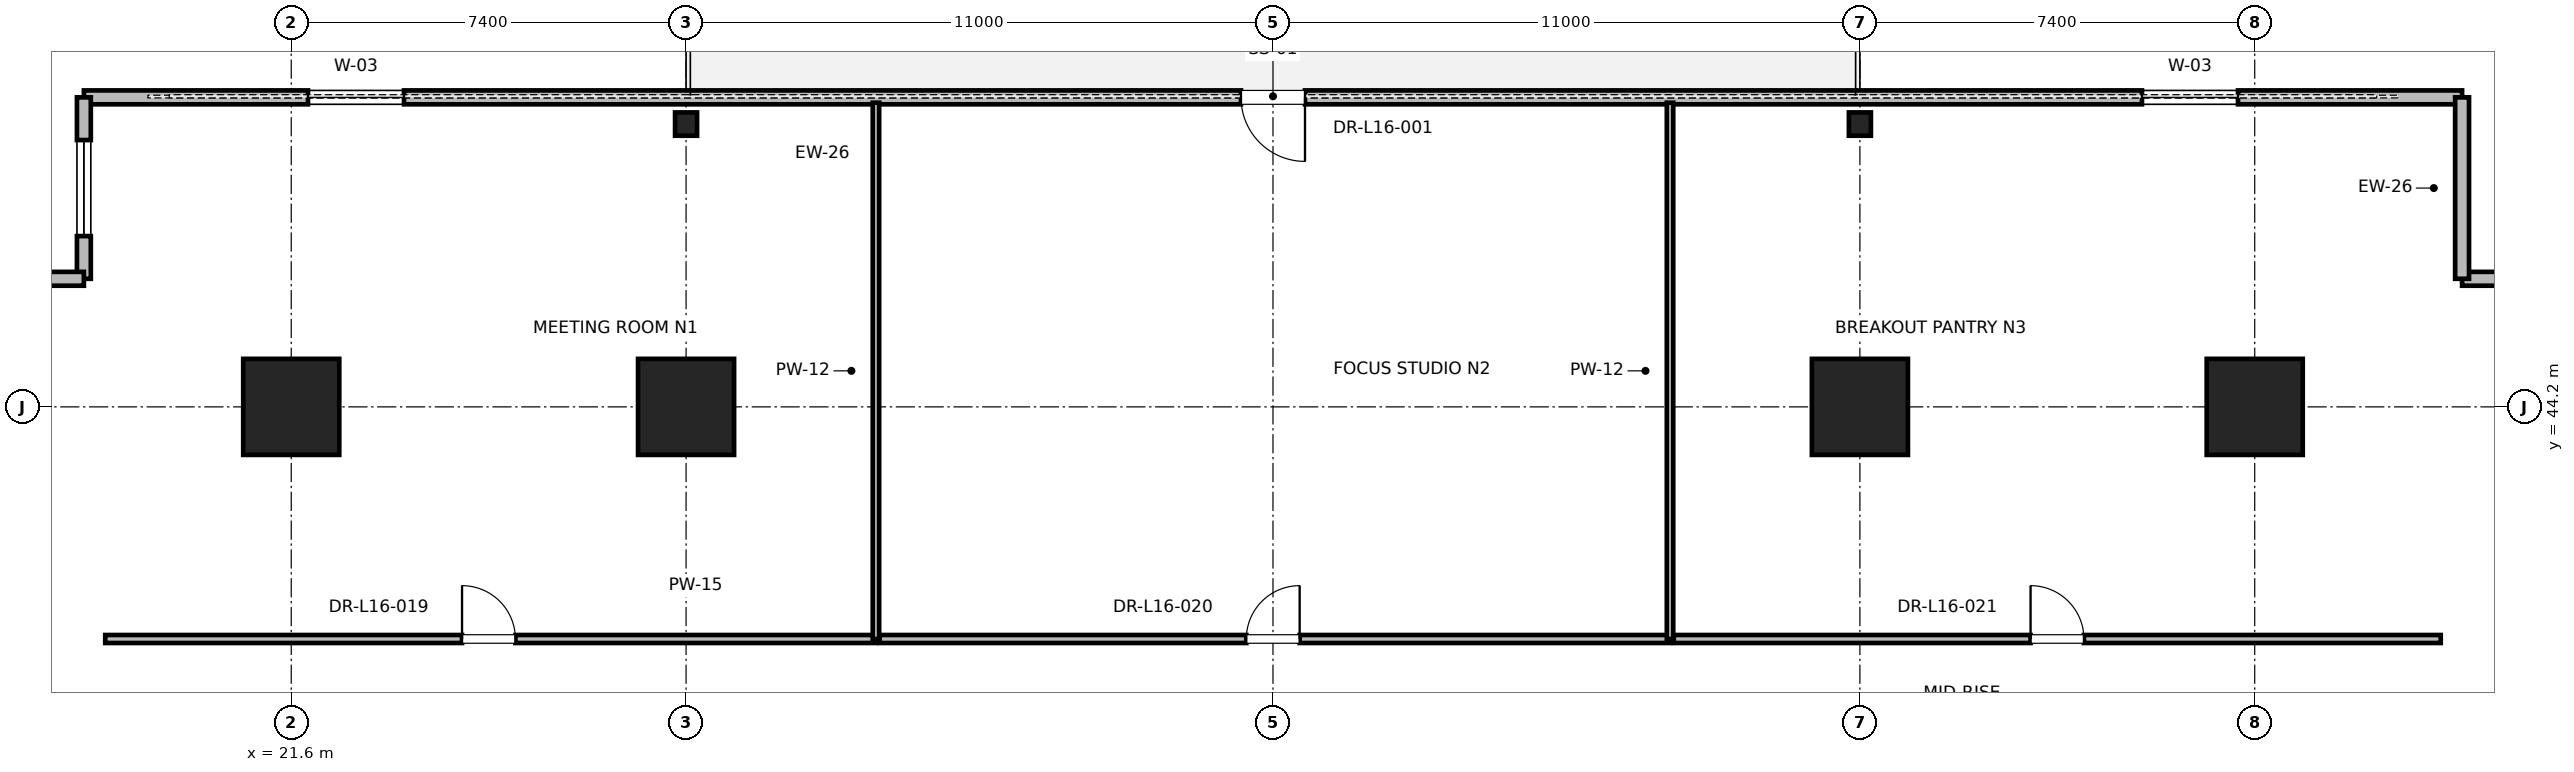
"""IFC4 building model, lengths in metres.
Left out: names, types, materials, properties, quantities, classifications, styles, units other than length and angle.
Written with IfcOpenShell. Run it as: python <this file> out.ifc"""

import sys

from ifc_helpers import new_model, si_unit, direction, frame, frame_2d, origin, origin_2d, place, context, subcontext, project, spatial, rectangle, i_section, extrude, element, fill, save


model = new_model("IFC4")
c1 = context("Model", 3, precision=1e-05, world=origin(), true_north=direction((0.0, 1.0)))
c2 = subcontext(c1, "Body", "Model", "MODEL_VIEW")
j1 = project(units=[si_unit("LENGTHUNIT", "METRE"), si_unit("PLANEANGLEUNIT", "RADIAN")], contexts=[c1])
p1 = place(None, origin())
s1 = spatial("IfcSite", under=j1, at=p1, CompositionType="ELEMENT")
p2 = place(p1, origin())
s2 = spatial("IfcBuilding", under=s1, at=p2, CompositionType="ELEMENT")
p3 = place(p2, frame((0.0, 0.0, 71.6)))
s3 = spatial("IfcBuildingStorey", under=s2, at=p3, CompositionType="ELEMENT", Elevation=71.6)
for number, where, z_axis, x_axis in (
    (1, (29.0, 44.2, 0.0), (0.0, 0.0, 1.0), (1.0, 0.0, 0.0)),
    (2, (51.0, 44.2, 0.0), (0.0, 0.0, 1.0), (1.0, 0.0, 0.0)),
    (3, (21.6, 44.2, 0.0), (0.0, 0.0, 1.0), (1.0, 0.0, 0.0)),
    (4, (58.4, 44.2, 0.0), (0.0, 0.0, 1.0), (1.0, 0.0, 0.0)),
):
    element("IfcColumn", number, at=place(p3, frame(where, z_axis=z_axis, x_axis=x_axis)), inside=s3, PredefinedType="COLUMN", context=c2, shape_type="SweptSolid", body=[
        extrude(rectangle(XDim=1.8, YDim=1.8, at=origin_2d()), origin(), (0.0, 0.0, 1.0), 4.0),
    ])
for number, where, z_axis, x_axis in (
    (5, (29.0, 49.5, 0.0), (0.0, 0.0, 1.0), (1.0, 0.0, 0.0)),
    (6, (51.0, 49.5, 0.0), (0.0, 0.0, 1.0), (1.0, 0.0, 0.0)),
):
    element("IfcColumn", number, at=place(p3, frame(where, z_axis=z_axis, x_axis=x_axis)), inside=s3, PredefinedType="COLUMN", context=c2, shape_type="SweptSolid", body=[
        extrude(i_section(OverallWidth=0.412, OverallDepth=0.437, WebThickness=0.036, FlangeThickness=0.058, FilletRadius=0.015, at=origin_2d()), origin(), (0.0, 0.0, 1.0), 4.0),
    ])
p4 = place(p3, frame((62.286, 50.0, 0.0), z_axis=(0.0, 0.0, 1.0), x_axis=(-1.0, 0.0, 0.0)))
e7 = element("IfcWall", 7, at=p4, inside=s3, PredefinedType="PARAPET", context=c2, shape_type="SweptSolid", body=[
    extrude(rectangle(XDim=44.573, YDim=0.26, at=frame_2d((22.286, 0.0))), origin(), (0.0, 0.0, 1.0), 2.889),
])
p5 = place(p4, frame((4.2, 0.0, 0.85)))
e8 = element("IfcOpeningElement", 8, at=p5, cuts=e7, PredefinedType="OPENING", context=c2, shape_type="SweptSolid", body=[
    extrude(rectangle(XDim=1.8, YDim=2.2, at=frame_2d((0.9, 1.1))), frame((0.0, 0.13, 0.0), z_axis=(0.0, -1.0, 0.0), x_axis=(1.0, 0.0, 0.0)), (0.0, 0.0, 1.0), 0.26),
])
p6 = place(p4, frame((21.686, 0.0, 0.0)))
e9 = element("IfcOpeningElement", 9, at=p6, cuts=e7, PredefinedType="OPENING", context=c2, shape_type="SweptSolid", body=[
    extrude(rectangle(XDim=1.2, YDim=2.2, at=frame_2d((0.6, 1.1))), frame((0.0, 0.13, 0.0), z_axis=(0.0, -1.0, 0.0), x_axis=(1.0, 0.0, 0.0)), (0.0, 0.0, 1.0), 0.26),
])
p7 = place(p4, frame((38.573, 0.0, 0.85)))
e10 = element("IfcOpeningElement", 10, at=p7, cuts=e7, PredefinedType="OPENING", context=c2, shape_type="SweptSolid", body=[
    extrude(rectangle(XDim=1.8, YDim=2.2, at=frame_2d((0.9, 1.1))), frame((0.0, 0.13, 0.0), z_axis=(0.0, -1.0, 0.0), x_axis=(1.0, 0.0, 0.0)), (0.0, 0.0, 1.0), 0.26),
])
p8 = place(p3, frame((66.086, 46.601, 0.0), z_axis=(0.0, 0.0, 1.0), x_axis=(-1.0, 0.0, 0.0)))
e11 = element("IfcWall", 11, at=p8, inside=s3, PredefinedType="PARAPET", context=c2, shape_type="SweptSolid", body=[
    extrude(rectangle(XDim=3.8, YDim=0.26, at=frame_2d((1.9, 0.0))), origin(), (0.0, 0.0, 1.0), 3.76),
])
p9 = place(p8, frame((1.0, 0.0, 0.85)))
e12 = element("IfcOpeningElement", 12, at=p9, cuts=e11, PredefinedType="OPENING", context=c2, shape_type="SweptSolid", body=[
    extrude(rectangle(XDim=1.8, YDim=2.2, at=frame_2d((0.9, 1.1))), frame((0.0, 0.13, 0.0), z_axis=(0.0, -1.0, 0.0), x_axis=(1.0, 0.0, 0.0)), (0.0, 0.0, 1.0), 0.26),
])
p10 = place(p3, frame((62.286, 46.601, 0.0), z_axis=(0.0, 0.0, 1.0), x_axis=(0.0, 1.0, 0.0)))
e13 = element("IfcWall", 13, at=p10, inside=s3, PredefinedType="PARAPET", context=c2, shape_type="SweptSolid", body=[
    extrude(rectangle(XDim=3.4, YDim=0.26, at=frame_2d((1.7, 0.0))), origin(), (0.0, 0.0, 1.0), 3.76),
])
p11 = place(p3, frame((17.714, 50.0, 0.0), z_axis=(0.0, 0.0, 1.0), x_axis=(0.0, -1.0, 0.0)))
e14 = element("IfcWall", 14, at=p11, inside=s3, PredefinedType="PARAPET", context=c2, shape_type="SweptSolid", body=[
    extrude(rectangle(XDim=3.4, YDim=0.26, at=frame_2d((1.7, 0.0))), origin(), (0.0, 0.0, 1.0), 3.76),
])
p12 = place(p11, frame((0.8, 0.0, 0.85)))
e15 = element("IfcOpeningElement", 15, at=p12, cuts=e14, PredefinedType="OPENING", context=c2, shape_type="SweptSolid", body=[
    extrude(rectangle(XDim=1.8, YDim=2.2, at=frame_2d((0.9, 1.1))), frame((0.0, 0.13, 0.0), z_axis=(0.0, -1.0, 0.0), x_axis=(1.0, 0.0, 0.0)), (0.0, 0.0, 1.0), 0.26),
])
p13 = place(p3, frame((17.714, 46.601, 0.0), z_axis=(0.0, 0.0, 1.0), x_axis=(-1.0, 0.0, 0.0)))
e16 = element("IfcWall", 16, at=p13, inside=s3, PredefinedType="PARAPET", context=c2, shape_type="SweptSolid", body=[
    extrude(rectangle(XDim=3.8, YDim=0.26, at=frame_2d((1.9, 0.0))), origin(), (0.0, 0.0, 1.0), 3.76),
])
p14 = place(p3, frame((18.114, 39.85, 0.0), z_axis=(0.0, 0.0, 1.0), x_axis=(1.0, 0.0, 0.0)))
e17 = element("IfcWall", 17, at=p14, inside=s3, PredefinedType="PARTITIONING", context=c2, shape_type="SweptSolid", body=[
    extrude(rectangle(XDim=14.445, YDim=0.15, at=frame_2d((7.223, 0.0))), origin(), (0.0, 0.0, 1.0), 2.85),
])
p15 = place(p14, frame((6.688, 0.0, 0.0)))
e18 = element("IfcOpeningElement", 18, at=p15, cuts=e17, PredefinedType="OPENING", context=c2, shape_type="SweptSolid", body=[
    extrude(rectangle(XDim=1.0, YDim=2.15, at=frame_2d((0.5, 1.075))), frame((0.0, 0.075, 0.0), z_axis=(0.0, -1.0, 0.0), x_axis=(1.0, 0.0, 0.0)), (0.0, 0.0, 1.0), 0.15),
])
p16 = place(p3, frame((32.559, 39.85, 0.0), z_axis=(0.0, 0.0, 1.0), x_axis=(0.0, 1.0, 0.0)))
e19 = element("IfcWall", 19, at=p16, inside=s3, PredefinedType="PARTITIONING", context=c2, shape_type="SweptSolid", body=[
    extrude(rectangle(XDim=10.05, YDim=0.12, at=frame_2d((5.025, 0.0))), origin(), (0.0, 0.0, 1.0), 2.39),
])
p17 = place(p3, frame((32.629, 39.85, 0.0), z_axis=(0.0, 0.0, 1.0), x_axis=(1.0, 0.0, 0.0)))
e20 = element("IfcWall", 20, at=p17, inside=s3, PredefinedType="PARTITIONING", context=c2, shape_type="SweptSolid", body=[
    extrude(rectangle(XDim=14.813, YDim=0.15, at=frame_2d((7.406, 0.0))), origin(), (0.0, 0.0, 1.0), 2.85),
])
p18 = place(p17, frame((6.871, 0.0, 0.0)))
e21 = element("IfcOpeningElement", 21, at=p18, cuts=e20, PredefinedType="OPENING", context=c2, shape_type="SweptSolid", body=[
    extrude(rectangle(XDim=1.0, YDim=2.15, at=frame_2d((0.5, 1.075))), frame((0.0, 0.075, 0.0), z_axis=(0.0, -1.0, 0.0), x_axis=(1.0, 0.0, 0.0)), (0.0, 0.0, 1.0), 0.15),
])
p19 = place(p3, frame((47.441, 39.85, 0.0), z_axis=(0.0, 0.0, 1.0), x_axis=(0.0, 1.0, 0.0)))
e22 = element("IfcWall", 22, at=p19, inside=s3, PredefinedType="PARTITIONING", context=c2, shape_type="SweptSolid", body=[
    extrude(rectangle(XDim=10.05, YDim=0.12, at=frame_2d((5.025, 0.0))), origin(), (0.0, 0.0, 1.0), 2.39),
])
p20 = place(p3, frame((47.511, 39.85, 0.0), z_axis=(0.0, 0.0, 1.0), x_axis=(1.0, 0.0, 0.0)))
e23 = element("IfcWall", 23, at=p20, inside=s3, PredefinedType="PARTITIONING", context=c2, shape_type="SweptSolid", body=[
    extrude(rectangle(XDim=14.375, YDim=0.15, at=frame_2d((7.188, 0.0))), origin(), (0.0, 0.0, 1.0), 2.85),
])
p21 = place(p20, frame((6.688, 0.0, 0.0)))
e24 = element("IfcOpeningElement", 24, at=p21, cuts=e23, PredefinedType="OPENING", context=c2, shape_type="SweptSolid", body=[
    extrude(rectangle(XDim=1.0, YDim=2.15, at=frame_2d((0.5, 1.075))), frame((0.0, 0.075, 0.0), z_axis=(0.0, -1.0, 0.0), x_axis=(1.0, 0.0, 0.0)), (0.0, 0.0, 1.0), 0.15),
])
p22 = place(p5, origin())
e25 = element("IfcWindow", 25, at=p22, inside=s3, PartitioningType="SINGLE_PANEL", PredefinedType="WINDOW", context=c2, shape_type="SweptSolid", body=[
    extrude(rectangle(XDim=1.8, YDim=2.2, at=frame_2d((0.9, 1.1))), frame((0.0, 0.03, 0.0), z_axis=(0.0, -1.0, 0.0), x_axis=(1.0, 0.0, 0.0)), (0.0, 0.0, 1.0), 0.06),
])
fill(e8, e25)
p23 = place(p6, origin())
e26 = element("IfcDoor", 26, at=p23, inside=s3, OperationType="SINGLE_SWING_LEFT", PredefinedType="DOOR", context=c2, shape_type="SweptSolid", body=[
    extrude(rectangle(XDim=1.2, YDim=2.2, at=frame_2d((0.6, 1.1))), frame((0.0, 0.025, 0.0), z_axis=(0.0, -1.0, 0.0), x_axis=(1.0, 0.0, 0.0)), (0.0, 0.0, 1.0), 0.05),
])
fill(e9, e26)
p24 = place(p7, origin())
e27 = element("IfcWindow", 27, at=p24, inside=s3, PartitioningType="SINGLE_PANEL", PredefinedType="WINDOW", context=c2, shape_type="SweptSolid", body=[
    extrude(rectangle(XDim=1.8, YDim=2.2, at=frame_2d((0.9, 1.1))), frame((0.0, 0.03, 0.0), z_axis=(0.0, -1.0, 0.0), x_axis=(1.0, 0.0, 0.0)), (0.0, 0.0, 1.0), 0.06),
])
fill(e10, e27)
p25 = place(p12, origin())
e28 = element("IfcWindow", 28, at=p25, inside=s3, PartitioningType="SINGLE_PANEL", PredefinedType="WINDOW", context=c2, shape_type="SweptSolid", body=[
    extrude(rectangle(XDim=1.8, YDim=2.2, at=frame_2d((0.9, 1.1))), frame((0.0, 0.03, 0.0), z_axis=(0.0, -1.0, 0.0), x_axis=(1.0, 0.0, 0.0)), (0.0, 0.0, 1.0), 0.06),
])
fill(e15, e28)
p26 = place(p15, origin())
e29 = element("IfcDoor", 29, at=p26, inside=s3, OperationType="SINGLE_SWING_LEFT", PredefinedType="DOOR", context=c2, shape_type="SweptSolid", body=[
    extrude(rectangle(XDim=1.0, YDim=2.15, at=frame_2d((0.5, 1.075))), frame((0.0, 0.025, 0.0), z_axis=(0.0, -1.0, 0.0), x_axis=(1.0, 0.0, 0.0)), (0.0, 0.0, 1.0), 0.05),
])
fill(e18, e29)
p27 = place(p18, origin())
e30 = element("IfcDoor", 30, at=p27, inside=s3, OperationType="SINGLE_SWING_RIGHT", PredefinedType="DOOR", context=c2, shape_type="SweptSolid", body=[
    extrude(rectangle(XDim=1.0, YDim=2.15, at=frame_2d((0.5, 1.075))), frame((0.0, 0.025, 0.0), z_axis=(0.0, -1.0, 0.0), x_axis=(1.0, 0.0, 0.0)), (0.0, 0.0, 1.0), 0.05),
])
fill(e21, e30)
p28 = place(p21, origin())
e31 = element("IfcDoor", 31, at=p28, inside=s3, OperationType="SINGLE_SWING_LEFT", PredefinedType="DOOR", context=c2, shape_type="SweptSolid", body=[
    extrude(rectangle(XDim=1.0, YDim=2.15, at=frame_2d((0.5, 1.075))), frame((0.0, 0.025, 0.0), z_axis=(0.0, -1.0, 0.0), x_axis=(1.0, 0.0, 0.0)), (0.0, 0.0, 1.0), 0.05),
])
fill(e24, e31)
save(model, sys.argv[1])
